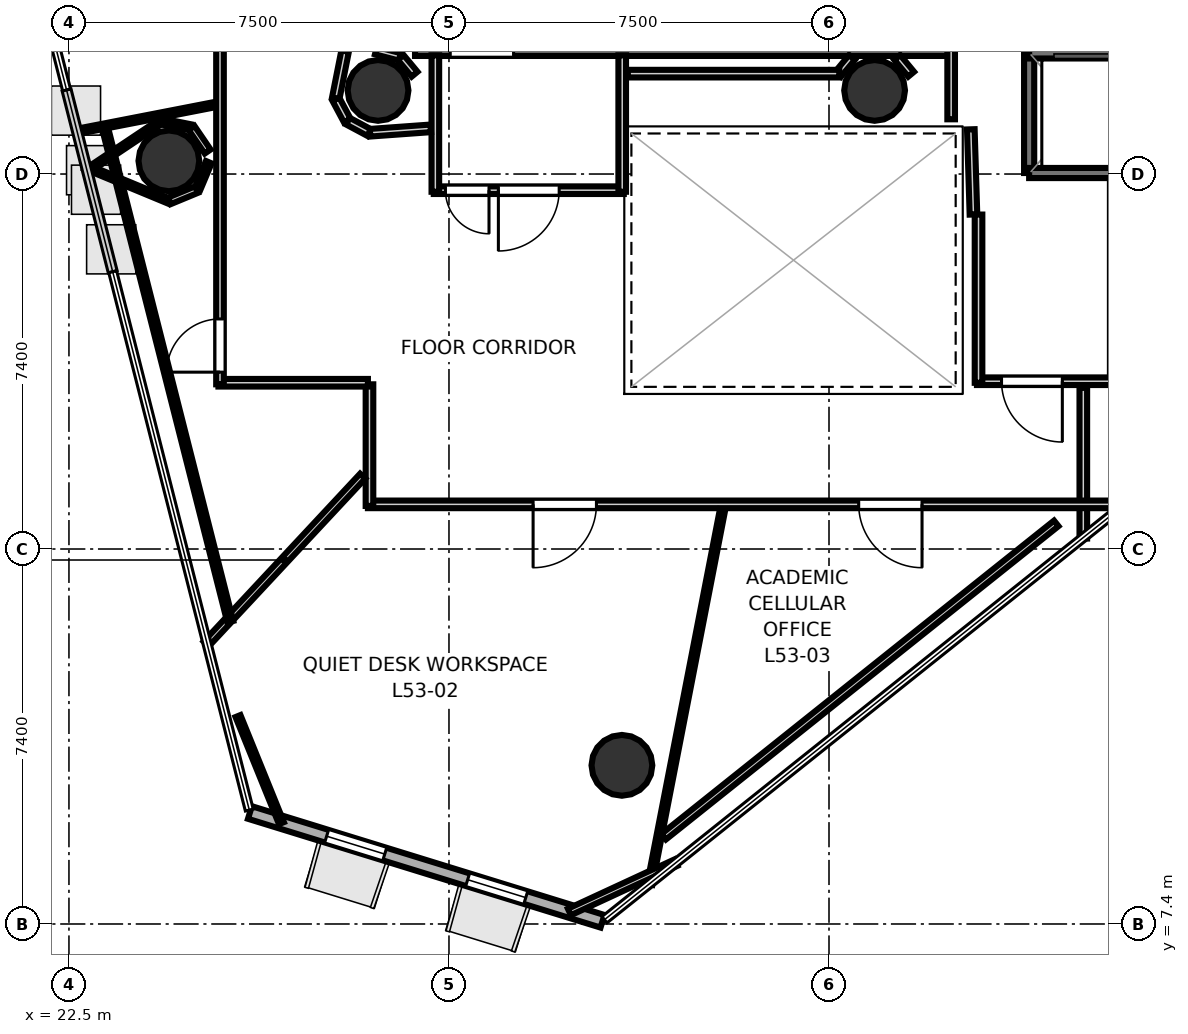
"""IFC4 building model, lengths in metres.
Left out: names, types, materials, properties, quantities, classifications, styles, units other than length and angle.
Written with IfcOpenShell. Run it as: python <this file> out.ifc"""

import sys

from ifc_helpers import new_model, si_unit, direction, frame, frame_2d, origin, origin_2d, place, context, subcontext, project, spatial, rectangle, hollow_circle, extrude, element, fill, save


model = new_model("IFC4")
c1 = context("Model", 3, precision=1e-05, world=origin(), true_north=direction((0.0, 1.0)))
c2 = subcontext(c1, "Body", "Model", "MODEL_VIEW")
j1 = project(units=[si_unit("LENGTHUNIT", "METRE"), si_unit("PLANEANGLEUNIT", "RADIAN")], contexts=[c1])
p1 = place(None, origin())
s1 = spatial("IfcSite", under=j1, at=p1, CompositionType="ELEMENT")
p2 = place(p1, origin())
s2 = spatial("IfcBuilding", under=s1, at=p2, CompositionType="ELEMENT")
p3 = place(p2, frame((0.0, 0.0, 207.7)))
s3 = spatial("IfcBuildingStorey", under=s2, at=p3, CompositionType="ELEMENT", Elevation=207.7)
p4 = place(p3, frame((29.33, 24.755, 0.0), z_axis=(0.0, 0.0, 1.0), x_axis=(1.0, 0.0, 0.0)))
e1 = element("IfcWall", 1, at=p4, inside=s3, PredefinedType="SHEAR", context=c2, shape_type="SweptSolid", body=[
    extrude(rectangle(XDim=10.52, YDim=0.45, at=frame_2d((5.26, 0.0))), origin(), (0.0, 0.0, 1.0), 3.52),
])
p5 = place(p4, frame((0.695, 0.0, 0.0)))
e2 = element("IfcOpeningElement", 2, at=p5, cuts=e1, PredefinedType="OPENING", context=c2, shape_type="SweptSolid", body=[
    extrude(rectangle(XDim=1.25, YDim=2.15, at=frame_2d((0.625, 1.075))), frame((0.0, 0.235, 0.0), z_axis=(0.0, -1.0, 0.0), x_axis=(1.0, 0.0, 0.0)), (0.0, 0.0, 1.0), 0.47),
])
for number, where, z_axis, x_axis in (
    (3, (28.6, 23.85, 0.0), (0.0, 0.0, 1.0), (1.0, 0.0, 0.0)),
    (4, (38.4, 23.85, 0.0), (0.0, 0.0, 1.0), (1.0, 0.0, 0.0)),
    (5, (24.472, 22.46, 0.0), (0.0, 0.0, 1.0), (1.0, 0.0, 0.0)),
    (6, (33.413, 10.531, 0.0), (0.0, 0.0, 1.0), (1.0, 0.0, 0.0)),
):
    element("IfcColumn", number, at=place(p3, frame(where, z_axis=z_axis, x_axis=x_axis)), inside=s3, PredefinedType="COLUMN", context=c2, shape_type="SweptSolid", body=[
        extrude(hollow_circle(Radius=0.6, WallThickness=0.03, at=origin_2d()), origin(), (0.0, 0.0, 1.0), 3.7),
    ])
p6 = place(p3, frame((26.072, 9.6, 0.0), z_axis=(0.0, 0.0, 1.0), x_axis=(0.955554726594, -0.294813779331, 0.0)))
e7 = element("IfcWall", 7, at=p6, inside=s3, PredefinedType="SOLIDWALL", context=c2, shape_type="SweptSolid", body=[
    extrude(rectangle(XDim=7.282, YDim=0.26, at=frame_2d((3.641, 0.0))), origin(), (0.0, 0.0, 1.0), 3.52),
])
p7 = place(p6, frame((1.584, 0.0, 0.9)))
e8 = element("IfcOpeningElement", 8, at=p7, cuts=e7, PredefinedType="OPENING", context=c2, shape_type="SweptSolid", body=[
    extrude(rectangle(XDim=1.2, YDim=2.0, at=frame_2d((0.6, 1.0))), frame((0.0, 0.14, 0.0), z_axis=(0.0, -1.0, 0.0), x_axis=(1.0, 0.0, 0.0)), (0.0, 0.0, 1.0), 0.28),
])
p8 = place(p6, frame((4.497, 0.0, 0.9)))
e9 = element("IfcOpeningElement", 9, at=p8, cuts=e7, PredefinedType="OPENING", context=c2, shape_type="SweptSolid", body=[
    extrude(rectangle(XDim=1.2, YDim=2.0, at=frame_2d((0.6, 1.0))), frame((0.0, 0.14, 0.0), z_axis=(0.0, -1.0, 0.0), x_axis=(1.0, 0.0, 0.0)), (0.0, 0.0, 1.0), 0.28),
])
p9 = place(p3, frame((41.45, 22.22, 0.0), z_axis=(0.0, 0.0, 1.0), x_axis=(0.0, 1.0, 0.0)))
e10 = element("IfcWall", 10, at=p9, inside=s3, PredefinedType="SOLIDWALL", context=c2, shape_type="SweptSolid", body=[
    extrude(rectangle(XDim=2.36, YDim=0.2, at=frame_2d((1.18, 0.0))), origin(), (0.0, 0.0, 1.0), 3.52),
])
for number, where, z_axis, x_axis in (
    (11, (41.45, 24.58, 0.0), (0.0, 0.0, 1.0), (1.0, 0.0, 0.0)),
    (12, (41.45, 22.22, 0.0), (0.0, 0.0, 1.0), (1.0, 0.0, 0.0)),
):
    element("IfcWall", number, at=place(p3, frame(where, z_axis=z_axis, x_axis=x_axis)), inside=s3, PredefinedType="SOLIDWALL", context=c2, shape_type="SweptSolid", body=[
        extrude(rectangle(XDim=2.1, YDim=0.2, at=frame_2d((1.05, 0.0))), origin(), (0.0, 0.0, 1.0), 3.52),
    ])
p10 = place(p3, frame((33.45, 21.881, 0.0), z_axis=(0.0, 0.0, 1.0), x_axis=(-1.0, 0.0, 0.0)))
e13 = element("IfcWall", 13, at=p10, inside=s3, PredefinedType="PARTITIONING", context=c2, shape_type="SweptSolid", body=[
    extrude(rectangle(XDim=3.75, YDim=0.15, at=frame_2d((1.875, 0.0))), origin(), (0.0, 0.0, 1.0), 2.84),
])
p11 = place(p10, frame((1.275, 0.0, 0.0)))
e14 = element("IfcOpeningElement", 14, at=p11, cuts=e13, PredefinedType="OPENING", context=c2, shape_type="SweptSolid", body=[
    extrude(rectangle(XDim=1.2, YDim=2.15, at=frame_2d((0.6, 1.075))), frame((0.0, 0.085, 0.0), z_axis=(0.0, -1.0, 0.0), x_axis=(1.0, 0.0, 0.0)), (0.0, 0.0, 1.0), 0.17),
])
p12 = place(p10, frame((2.66, 0.0, 0.0)))
e15 = element("IfcOpeningElement", 15, at=p12, cuts=e13, PredefinedType="OPENING", context=c2, shape_type="SweptSolid", body=[
    extrude(rectangle(XDim=0.86, YDim=2.05, at=frame_2d((0.43, 1.025))), frame((0.0, 0.085, 0.0), z_axis=(0.0, -1.0, 0.0), x_axis=(1.0, 0.0, 0.0)), (0.0, 0.0, 1.0), 0.17),
])
for number, where, z_axis, x_axis in (
    (16, (29.731, 21.85, 0.0), (0.0, 0.0, 1.0), (0.0, 1.0, 0.0)),
    (17, (33.419, 24.542, 0.0), (0.0, 0.0, 1.0), (0.0, -1.0, 0.0)),
):
    element("IfcWall", number, at=place(p3, frame(where, z_axis=z_axis, x_axis=x_axis)), inside=s3, PredefinedType="PARTITIONING", context=c2, shape_type="SweptSolid", body=[
        extrude(rectangle(XDim=2.692, YDim=0.15, at=frame_2d((1.346, 0.0))), origin(), (0.0, 0.0, 1.0), 2.84),
    ])
p13 = place(p3, frame((40.351, 21.401, 0.0), z_axis=(0.0, 0.0, 1.0), x_axis=(-0.031058045979, 0.999517582527, 0.0)))
e18 = element("IfcWall", 18, at=p13, inside=s3, PredefinedType="PARTITIONING", context=c2, shape_type="SweptSolid", body=[
    extrude(rectangle(XDim=1.682, YDim=0.15, at=frame_2d((0.841, 0.0))), origin(), (0.0, 0.0, 1.0), 2.84),
])
p14 = place(p3, frame((39.911, 23.28, 0.0), z_axis=(0.0, 0.0, 1.0), x_axis=(0.0, 1.0, 0.0)))
e19 = element("IfcWall", 19, at=p14, inside=s3, PredefinedType="PARTITIONING", context=c2, shape_type="SweptSolid", body=[
    extrude(rectangle(XDim=1.48, YDim=0.15, at=frame_2d((0.74, 0.0))), origin(), (0.0, 0.0, 1.0), 2.84),
])
p15 = place(p3, frame((43.15, 18.111, 0.0), z_axis=(0.0, 0.0, 1.0), x_axis=(-1.0, 0.0, 0.0)))
e20 = element("IfcWall", 20, at=p15, inside=s3, PredefinedType="PARTITIONING", context=c2, shape_type="SweptSolid", body=[
    extrude(rectangle(XDim=2.73, YDim=0.15, at=frame_2d((1.365, 0.0))), origin(), (0.0, 0.0, 1.0), 2.84),
])
p16 = place(p15, frame((1.045, 0.0, 0.0)))
e21 = element("IfcOpeningElement", 21, at=p16, cuts=e20, PredefinedType="OPENING", context=c2, shape_type="SweptSolid", body=[
    extrude(rectangle(XDim=1.2, YDim=2.15, at=frame_2d((0.6, 1.075))), frame((0.0, 0.085, 0.0), z_axis=(0.0, -1.0, 0.0), x_axis=(1.0, 0.0, 0.0)), (0.0, 0.0, 1.0), 0.17),
])
p17 = place(p3, frame((40.451, 18.08, 0.0), z_axis=(0.0, 0.0, 1.0), x_axis=(0.0, 1.0, 0.0)))
e22 = element("IfcWall", 22, at=p17, inside=s3, PredefinedType="PARTITIONING", context=c2, shape_type="SweptSolid", body=[
    extrude(rectangle(XDim=3.32, YDim=0.15, at=frame_2d((1.66, 0.0))), origin(), (0.0, 0.0, 1.0), 2.84),
])
p18 = place(p3, frame((29.321, 24.17, 0.0), z_axis=(0.0, 0.0, 1.0), x_axis=(-0.638008265708, 0.770029514296, 0.0)))
e23 = element("IfcWall", 23, at=p18, inside=s3, PredefinedType="PARTITIONING", context=c2, shape_type="SweptSolid", body=[
    extrude(rectangle(XDim=0.431, YDim=0.15, at=frame_2d((0.215, 0.0))), origin(), (0.0, 0.0, 1.0), 2.84),
])
p19 = place(p3, frame((29.03, 24.512, 0.0), z_axis=(0.0, 0.0, 1.0), x_axis=(-0.967681003213, 0.252177469296, 0.0)))
e24 = element("IfcWall", 24, at=p19, inside=s3, PredefinedType="PARTITIONING", context=c2, shape_type="SweptSolid", body=[
    extrude(rectangle(XDim=0.488, YDim=0.15, at=frame_2d((0.244, 0.0))), origin(), (0.0, 0.0, 1.0), 2.84),
])
for number, where, z_axis, x_axis in (
    (25, (39.121, 24.17, 0.0), (0.0, 0.0, 1.0), (-0.638, 0.77, 0.0)),
    (26, (37.954, 24.502, 0.0), (0.0, 0.0, 1.0), (-0.638, -0.77, 0.0)),
):
    element("IfcWall", number, at=place(p3, frame(where, z_axis=z_axis, x_axis=x_axis)), inside=s3, PredefinedType="PARTITIONING", context=c2, shape_type="SweptSolid", body=[
        extrude(rectangle(XDim=0.431, YDim=0.15, at=frame_2d((0.215, 0.0))), origin(), (0.0, 0.0, 1.0), 2.84),
    ])
p20 = place(p3, frame((37.703, 24.181, 0.0), z_axis=(0.0, 0.0, 1.0), x_axis=(-1.0, 0.0, 0.0)))
e27 = element("IfcWall", 27, at=p20, inside=s3, PredefinedType="PARTITIONING", context=c2, shape_type="SweptSolid", body=[
    extrude(rectangle(XDim=4.173, YDim=0.15, at=frame_2d((2.086, 0.0))), origin(), (0.0, 0.0, 1.0), 2.84),
])
p21 = place(p3, frame((27.95, 24.626, 0.0), z_axis=(0.0, 0.0, 1.0), x_axis=(-0.195125950178, -0.980778192848, 0.0)))
e28 = element("IfcWall", 28, at=p21, inside=s3, PredefinedType="PARTITIONING", context=c2, shape_type="SweptSolid", body=[
    extrude(rectangle(XDim=0.948, YDim=0.15, at=frame_2d((0.474, 0.0))), origin(), (0.0, 0.0, 1.0), 2.84),
])
for number, where, z_axis, x_axis in (
    (29, (27.768, 23.675, 0.0), (0.0, 0.0, 1.0), (0.472, -0.882, 0.0)),
    (30, (28.006, 23.243, 0.0), (0.0, 0.0, 1.0), (0.882, -0.472, 0.0)),
):
    element("IfcWall", number, at=place(p3, frame(where, z_axis=z_axis, x_axis=x_axis)), inside=s3, PredefinedType="PARTITIONING", context=c2, shape_type="SweptSolid", body=[
        extrude(rectangle(XDim=0.476, YDim=0.15, at=frame_2d((0.238, 0.0))), origin(), (0.0, 0.0, 1.0), 2.84),
    ])
p22 = place(p3, frame((28.442, 23.015, 0.0), z_axis=(0.0, 0.0, 1.0), x_axis=(0.99740683837, 0.07196942943, 0.0)))
e31 = element("IfcWall", 31, at=p22, inside=s3, PredefinedType="PARTITIONING", context=c2, shape_type="SweptSolid", body=[
    extrude(rectangle(XDim=1.201, YDim=0.15, at=frame_2d((0.601, 0.0))), origin(), (0.0, 0.0, 1.0), 2.84),
])
p23 = place(p3, frame((42.519, 17.98, 0.0), z_axis=(0.0, 0.0, 1.0), x_axis=(0.0, -1.0, 0.0)))
e32 = element("IfcWall", 32, at=p23, inside=s3, PredefinedType="PARTITIONING", context=c2, shape_type="SweptSolid", body=[
    extrude(rectangle(XDim=2.973, YDim=0.15, at=frame_2d((1.487, 0.0))), origin(), (0.0, 0.0, 1.0), 2.84),
])
p24 = place(p3, frame((43.359, 15.681, 0.0), z_axis=(0.0, 0.0, 1.0), x_axis=(-1.0, 0.0, 0.0)))
e33 = element("IfcWall", 33, at=p24, inside=s3, PredefinedType="PARTITIONING", context=c2, shape_type="SweptSolid", body=[
    extrude(rectangle(XDim=14.959, YDim=0.15, at=frame_2d((7.479, 0.0))), origin(), (0.0, 0.0, 1.0), 2.84),
])
p25 = place(p24, frame((10.448, 0.0, 0.0)))
e34 = element("IfcOpeningElement", 34, at=p25, cuts=e33, PredefinedType="OPENING", context=c2, shape_type="SweptSolid", body=[
    extrude(rectangle(XDim=1.25, YDim=2.2, at=frame_2d((0.625, 1.1))), frame((0.0, 0.085, 0.0), z_axis=(0.0, -1.0, 0.0), x_axis=(1.0, 0.0, 0.0)), (0.0, 0.0, 1.0), 0.17),
])
p26 = place(p24, frame((4.023, 0.0, 0.0)))
e35 = element("IfcOpeningElement", 35, at=p26, cuts=e33, PredefinedType="OPENING", context=c2, shape_type="SweptSolid", body=[
    extrude(rectangle(XDim=1.25, YDim=2.2, at=frame_2d((0.625, 1.1))), frame((0.0, 0.085, 0.0), z_axis=(0.0, -1.0, 0.0), x_axis=(1.0, 0.0, 0.0)), (0.0, 0.0, 1.0), 0.17),
])
p27 = place(p3, frame((28.431, 15.65, 0.0), z_axis=(0.0, 0.0, 1.0), x_axis=(0.0, 1.0, 0.0)))
e36 = element("IfcWall", 36, at=p27, inside=s3, PredefinedType="PARTITIONING", context=c2, shape_type="SweptSolid", body=[
    extrude(rectangle(XDim=2.4, YDim=0.15, at=frame_2d((1.2, 0.0))), origin(), (0.0, 0.0, 1.0), 2.84),
])
p28 = place(p3, frame((28.4, 18.081, 0.0), z_axis=(0.0, 0.0, 1.0), x_axis=(-1.0, 0.0, 0.0)))
e37 = element("IfcWall", 37, at=p28, inside=s3, PredefinedType="PARTITIONING", context=c2, shape_type="SweptSolid", body=[
    extrude(rectangle(XDim=2.95, YDim=0.15, at=frame_2d((1.475, 0.0))), origin(), (0.0, 0.0, 1.0), 2.84),
])
p29 = place(p3, frame((25.481, 18.05, 0.0), z_axis=(0.0, 0.0, 1.0), x_axis=(0.0, 1.0, 0.0)))
e38 = element("IfcWall", 38, at=p29, inside=s3, PredefinedType="PARTITIONING", context=c2, shape_type="SweptSolid", body=[
    extrude(rectangle(XDim=18.219, YDim=0.15, at=frame_2d((9.109, 0.0))), origin(), (0.0, 0.0, 1.0), 2.84),
])
p30 = place(p29, frame((0.24, 0.0, 0.0)))
e39 = element("IfcOpeningElement", 39, at=p30, cuts=e38, PredefinedType="OPENING", context=c2, shape_type="SweptSolid", body=[
    extrude(rectangle(XDim=1.05, YDim=2.15, at=frame_2d((0.525, 1.075))), frame((0.0, 0.085, 0.0), z_axis=(0.0, -1.0, 0.0), x_axis=(1.0, 0.0, 0.0)), (0.0, 0.0, 1.0), 0.17),
])
p31 = place(p29, frame((10.93, 0.0, 0.0)))
e40 = element("IfcOpeningElement", 40, at=p31, cuts=e38, PredefinedType="OPENING", context=c2, shape_type="SweptSolid", body=[
    extrude(rectangle(XDim=1.25, YDim=2.2, at=frame_2d((0.625, 1.1))), frame((0.0, 0.085, 0.0), z_axis=(0.0, -1.0, 0.0), x_axis=(1.0, 0.0, 0.0)), (0.0, 0.0, 1.0), 0.17),
])
p32 = place(p3, frame((28.297, 16.238, 0.0), z_axis=(0.0, 0.0, 1.0), x_axis=(-0.682005005736, -0.731347504372, 0.0)))
e41 = element("IfcWall", 41, at=p32, inside=s3, PredefinedType="PARTITIONING", context=c2, shape_type="SweptSolid", body=[
    extrude(rectangle(XDim=4.527, YDim=0.14, at=frame_2d((2.264, 0.0))), origin(), (0.0, 0.0, 1.0), 2.84),
])
p33 = place(p3, frame((25.684, 13.366, 0.0), z_axis=(0.0, 0.0, 1.0), x_axis=(-0.245972953106, 0.969276692354, 0.0)))
e42 = element("IfcWall", 42, at=p33, inside=s3, PredefinedType="PARTITIONING", context=c2, shape_type="SweptSolid", body=[
    extrude(rectangle(XDim=10.123, YDim=0.12, at=frame_2d((5.062, 0.0))), origin(), (0.0, 0.0, 1.0), 2.84),
])
p34 = place(p3, frame((22.641, 23.037, 0.0), z_axis=(0.0, 0.0, 1.0), x_axis=(0.981621317476, 0.19083917071, 0.0)))
e43 = element("IfcWall", 43, at=p34, inside=s3, PredefinedType="PARTITIONING", context=c2, shape_type="SweptSolid", body=[
    extrude(rectangle(XDim=2.786, YDim=0.105, at=frame_2d((1.393, 0.0))), origin(), (0.0, 0.0, 1.0), 2.84),
])
p35 = place(p3, frame((25.238, 22.644, 0.0), z_axis=(0.0, 0.0, 1.0), x_axis=(-0.563363697458, 0.826209019792, 0.0)))
e44 = element("IfcWall", 44, at=p35, inside=s3, PredefinedType="PARTITIONING", context=c2, shape_type="SweptSolid", body=[
    extrude(rectangle(XDim=0.564, YDim=0.14, at=frame_2d((0.282, 0.0))), origin(), (0.0, 0.0, 1.0), 2.84),
])
p36 = place(p3, frame((24.9, 23.122, 0.0), z_axis=(0.0, 0.0, 1.0), x_axis=(-0.980773892286, 0.195147565217, 0.0)))
e45 = element("IfcWall", 45, at=p36, inside=s3, PredefinedType="PARTITIONING", context=c2, shape_type="SweptSolid", body=[
    extrude(rectangle(XDim=0.582, YDim=0.12, at=frame_2d((0.291, 0.0))), origin(), (0.0, 0.0, 1.0), 2.84),
])
p37 = place(p3, frame((24.306, 23.231, 0.0), z_axis=(0.0, 0.0, 1.0), x_axis=(-0.831388966537, -0.555690908978, 0.0)))
e46 = element("IfcWall", 46, at=p37, inside=s3, PredefinedType="PARTITIONING", context=c2, shape_type="SweptSolid", body=[
    extrude(rectangle(XDim=1.762, YDim=0.105, at=frame_2d((0.881, 0.0))), origin(), (0.0, 0.0, 1.0), 2.84),
])
p38 = place(p3, frame((22.819, 22.351, 0.0), z_axis=(0.0, 0.0, 1.0), x_axis=(0.923847632456, -0.382760436833, 0.0)))
e47 = element("IfcWall", 47, at=p38, inside=s3, PredefinedType="PARTITIONING", context=c2, shape_type="SweptSolid", body=[
    extrude(rectangle(XDim=1.776, YDim=0.105, at=frame_2d((0.888, 0.0))), origin(), (0.0, 0.0, 1.0), 2.84),
])
p39 = place(p3, frame((24.484, 21.671, 0.0), z_axis=(0.0, 0.0, 1.0), x_axis=(0.923832639322, 0.382796622927, 0.0)))
e48 = element("IfcWall", 48, at=p39, inside=s3, PredefinedType="PARTITIONING", context=c2, shape_type="SweptSolid", body=[
    extrude(rectangle(XDim=0.582, YDim=0.14, at=frame_2d((0.291, 0.0))), origin(), (0.0, 0.0, 1.0), 2.84),
])
p40 = place(p3, frame((25.038, 21.91, 0.0), z_axis=(0.0, 0.0, 1.0), x_axis=(0.389093528864, 0.921198255424, 0.0)))
e49 = element("IfcWall", 49, at=p40, inside=s3, PredefinedType="PARTITIONING", context=c2, shape_type="SweptSolid", body=[
    extrude(rectangle(XDim=0.568, YDim=0.12, at=frame_2d((0.284, 0.0))), origin(), (0.0, 0.0, 1.0), 2.84),
])
p41 = place(p3, frame((35.399, 15.576, 0.0), z_axis=(0.0, 0.0, 1.0), x_axis=(-0.190815879086, -0.981625845365, 0.0)))
e50 = element("IfcWall", 50, at=p41, inside=s3, PredefinedType="PARTITIONING", context=c2, shape_type="SweptSolid", body=[
    extrude(rectangle(XDim=7.533, YDim=0.105, at=frame_2d((3.767, 0.0))), origin(), (0.0, 0.0, 1.0), 2.84),
])
p42 = place(p3, frame((34.481, 8.612, 0.0), z_axis=(0.0, 0.0, 1.0), x_axis=(-0.907459472768, -0.420139625939, 0.0)))
e51 = element("IfcWall", 51, at=p42, inside=s3, PredefinedType="PARTITIONING", context=c2, shape_type="SweptSolid", body=[
    extrude(rectangle(XDim=2.319, YDim=0.14, at=frame_2d((1.159, 0.0))), origin(), (0.0, 0.0, 1.0), 2.84),
])
p43 = place(p3, frame((26.693, 9.39, 0.0), z_axis=(0.0, 0.0, 1.0), x_axis=(-0.375816945489, 0.926693921143, 0.0)))
e52 = element("IfcWall", 52, at=p43, inside=s3, PredefinedType="PARTITIONING", context=c2, shape_type="SweptSolid", body=[
    extrude(rectangle(XDim=2.28, YDim=0.105, at=frame_2d((1.14, 0.0))), origin(), (0.0, 0.0, 1.0), 2.84),
])
p44 = place(p3, frame((41.985, 15.305, 0.0), z_axis=(0.0, 0.0, 1.0), x_axis=(-0.781601250274, -0.623778394601, 0.0)))
e53 = element("IfcWall", 53, at=p44, inside=s3, PredefinedType="PARTITIONING", context=c2, shape_type="SweptSolid", body=[
    extrude(rectangle(XDim=9.911, YDim=0.14, at=frame_2d((4.956, 0.0))), origin(), (0.0, 0.0, 1.0), 2.84),
])
p45 = place(p11, origin())
e54 = element("IfcDoor", 54, at=p45, inside=s3, OperationType="SINGLE_SWING_RIGHT", PredefinedType="DOOR", context=c2, shape_type="SweptSolid", body=[
    extrude(rectangle(XDim=1.2, YDim=2.15, at=frame_2d((0.6, 1.075))), frame((0.0, 0.025, 0.0), z_axis=(0.0, -1.0, 0.0), x_axis=(1.0, 0.0, 0.0)), (0.0, 0.0, 1.0), 0.05),
])
fill(e14, e54)
p46 = place(p16, origin())
e55 = element("IfcDoor", 55, at=p46, inside=s3, OperationType="SINGLE_SWING_LEFT", PredefinedType="DOOR", context=c2, shape_type="SweptSolid", body=[
    extrude(rectangle(XDim=1.2, YDim=2.15, at=frame_2d((0.6, 1.075))), frame((0.0, 0.025, 0.0), z_axis=(0.0, -1.0, 0.0), x_axis=(1.0, 0.0, 0.0)), (0.0, 0.0, 1.0), 0.05),
])
fill(e21, e55)
p47 = place(p12, origin())
e56 = element("IfcDoor", 56, at=p47, inside=s3, OperationType="SINGLE_SWING_LEFT", PredefinedType="DOOR", context=c2, shape_type="SweptSolid", body=[
    extrude(rectangle(XDim=0.86, YDim=2.05, at=frame_2d((0.43, 1.025))), frame((0.0, 0.025, 0.0), z_axis=(0.0, -1.0, 0.0), x_axis=(1.0, 0.0, 0.0)), (0.0, 0.0, 1.0), 0.05),
])
fill(e15, e56)
p48 = place(p30, origin())
e57 = element("IfcDoor", 57, at=p48, inside=s3, OperationType="SINGLE_SWING_LEFT", PredefinedType="DOOR", context=c2, shape_type="SweptSolid", body=[
    extrude(rectangle(XDim=1.05, YDim=2.15, at=frame_2d((0.525, 1.075))), frame((0.0, 0.025, 0.0), z_axis=(0.0, -1.0, 0.0), x_axis=(1.0, 0.0, 0.0)), (0.0, 0.0, 1.0), 0.05),
])
fill(e39, e57)
p49 = place(p25, origin())
e58 = element("IfcDoor", 58, at=p49, inside=s3, OperationType="SINGLE_SWING_RIGHT", PredefinedType="DOOR", context=c2, shape_type="SweptSolid", body=[
    extrude(rectangle(XDim=1.25, YDim=2.2, at=frame_2d((0.625, 1.1))), frame((0.0, 0.025, 0.0), z_axis=(0.0, -1.0, 0.0), x_axis=(1.0, 0.0, 0.0)), (0.0, 0.0, 1.0), 0.05),
])
fill(e34, e58)
p50 = place(p26, origin())
e59 = element("IfcDoor", 59, at=p50, inside=s3, OperationType="SINGLE_SWING_LEFT", PredefinedType="DOOR", context=c2, shape_type="SweptSolid", body=[
    extrude(rectangle(XDim=1.25, YDim=2.2, at=frame_2d((0.625, 1.1))), frame((0.0, 0.025, 0.0), z_axis=(0.0, -1.0, 0.0), x_axis=(1.0, 0.0, 0.0)), (0.0, 0.0, 1.0), 0.05),
])
fill(e35, e59)
p51 = place(p7, origin())
e60 = element("IfcWindow", 60, at=p51, inside=s3, PartitioningType="SINGLE_PANEL", PredefinedType="WINDOW", context=c2, shape_type="SweptSolid", body=[
    extrude(rectangle(XDim=1.2, YDim=2.0, at=frame_2d((0.6, 1.0))), frame((0.0, 0.03, 0.0), z_axis=(0.0, -1.0, 0.0), x_axis=(1.0, 0.0, 0.0)), (0.0, 0.0, 1.0), 0.06),
])
fill(e8, e60)
p52 = place(p8, origin())
e61 = element("IfcWindow", 61, at=p52, inside=s3, PartitioningType="SINGLE_PANEL", PredefinedType="WINDOW", context=c2, shape_type="SweptSolid", body=[
    extrude(rectangle(XDim=1.2, YDim=2.0, at=frame_2d((0.6, 1.0))), frame((0.0, 0.03, 0.0), z_axis=(0.0, -1.0, 0.0), x_axis=(1.0, 0.0, 0.0)), (0.0, 0.0, 1.0), 0.06),
])
fill(e9, e61)
save(model, sys.argv[1])
